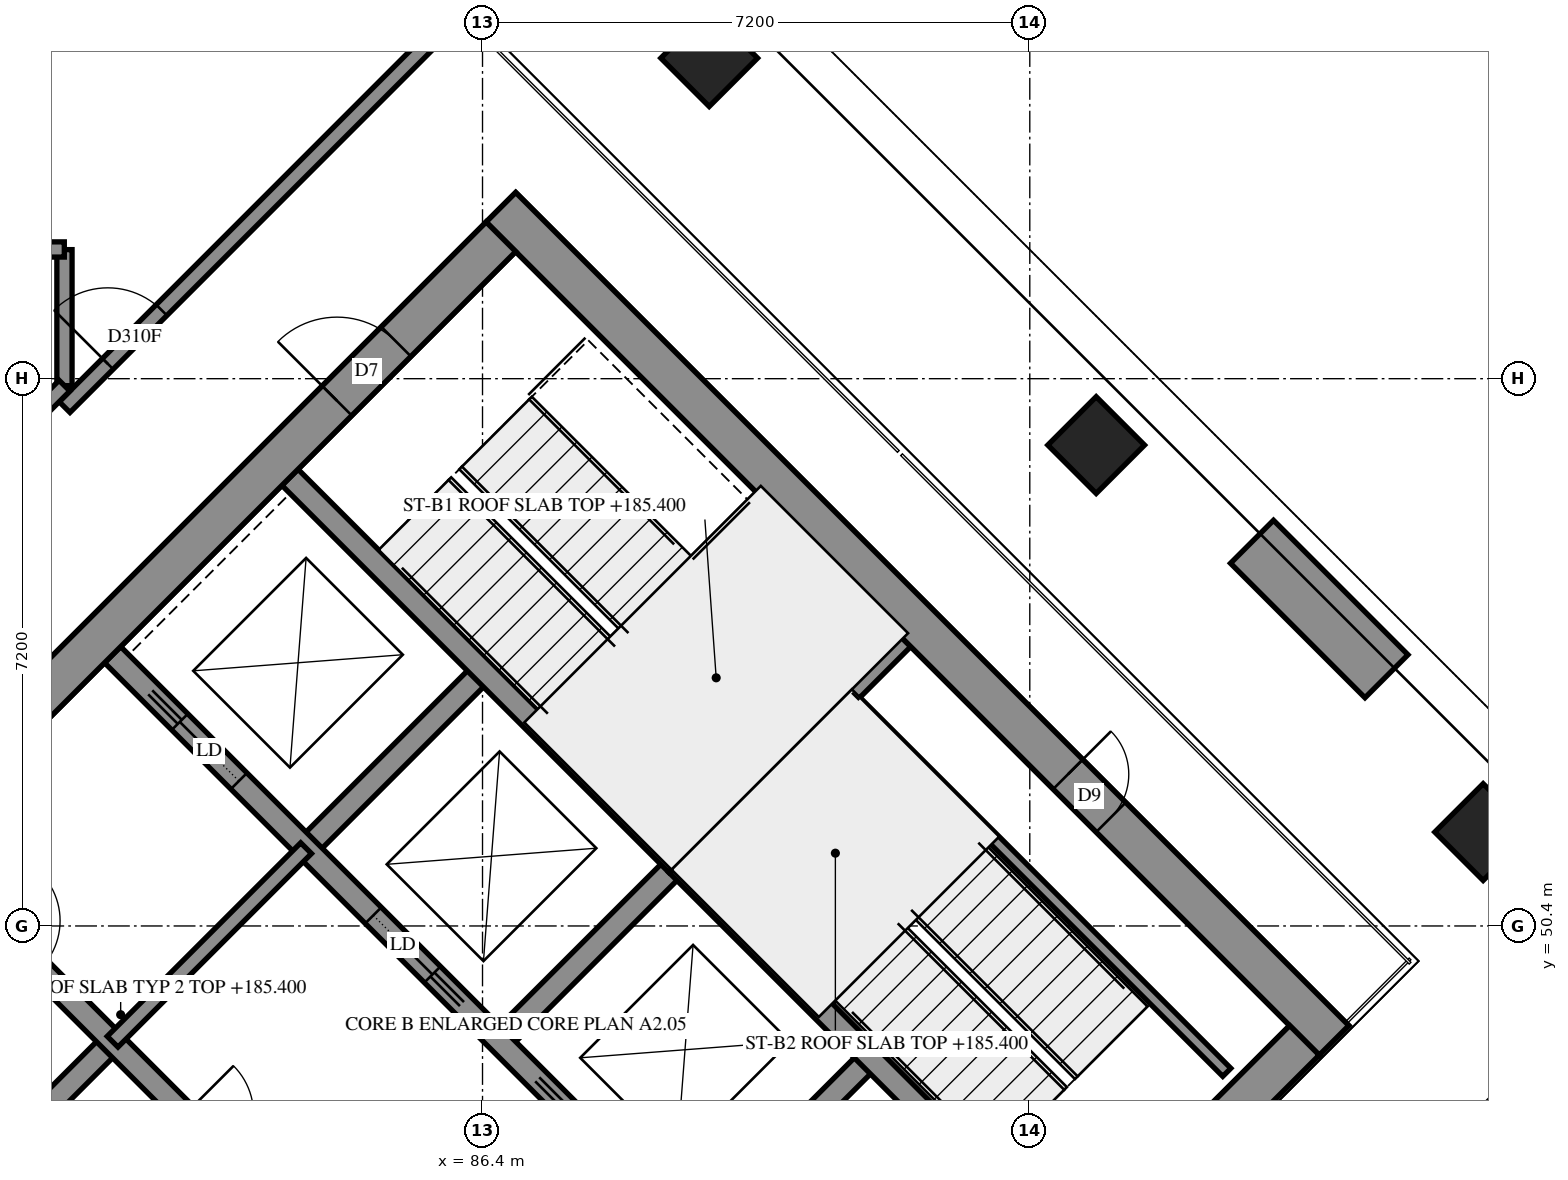
"""IFC4 building model, lengths in metres.
Left out: names, types, materials, properties, quantities, classifications, styles, units other than length and angle.
Written with IfcOpenShell. Run it as: python <this file> out.ifc"""

import sys

from ifc_helpers import new_model, si_unit, direction, frame, frame_2d, origin, origin_2d, place, context, subcontext, project, spatial, rectangle, extrude, element, fill, save


model = new_model("IFC4")
c1 = context("Model", 3, precision=1e-05, world=origin(), true_north=direction((0.0, 1.0)))
c2 = subcontext(c1, "Body", "Model", "MODEL_VIEW")
j1 = project(units=[si_unit("LENGTHUNIT", "METRE"), si_unit("PLANEANGLEUNIT", "RADIAN")], contexts=[c1])
p1 = place(None, origin())
s1 = spatial("IfcSite", under=j1, at=p1, CompositionType="ELEMENT")
p2 = place(p1, origin())
s2 = spatial("IfcBuilding", under=s1, at=p2, CompositionType="ELEMENT")
p3 = place(p2, frame((0.0, 0.0, 185.4)))
s3 = spatial("IfcBuildingStorey", under=s2, at=p3, CompositionType="ELEMENT", Elevation=185.4)
for number, where, z_axis, x_axis in (
    (1, (89.382, 61.818, 0.0), (0.0, 0.0, 1.0), (0.707, -0.707, 0.0)),
    (2, (94.474, 56.727, 0.0), (0.0, 0.0, 1.0), (0.707, -0.707, 0.0)),
    (3, (99.565, 51.635, 0.0), (0.0, 0.0, 1.0), (0.707, -0.707, 0.0)),
):
    element("IfcColumn", number, at=place(p3, frame(where, z_axis=z_axis, x_axis=x_axis)), inside=s3, PredefinedType="COLUMN", context=c2, shape_type="SweptSolid", body=[
        extrude(rectangle(XDim=0.9, YDim=0.9, at=origin_2d()), origin(), (0.0, 0.0, 1.0), 3.9),
    ])
p4 = place(p3, frame((76.071, 49.284, -0.3), z_axis=(0.0, 0.0, 1.0), x_axis=(0.7071035554, -0.707110007, 0.0)))
e4 = element("IfcWall", 4, at=p4, inside=s3, PredefinedType="SHEAR", context=c2, shape_type="SweptSolid", body=[
    extrude(rectangle(XDim=15.5, YDim=0.55, at=frame_2d((7.75, 0.0))), origin(), (0.0, 0.0, 1.0), 3.5),
])
p5 = place(p3, frame((86.642, 59.855, -0.3), z_axis=(0.0, 0.0, 1.0), x_axis=(0.707110007, -0.7071035554, 0.0)))
e5 = element("IfcWall", 5, at=p5, inside=s3, PredefinedType="SHEAR", context=c2, shape_type="SweptSolid", body=[
    extrude(rectangle(XDim=15.5, YDim=0.55, at=frame_2d((7.75, 0.0))), origin(), (0.0, 0.0, 1.0), 3.5),
])
p6 = place(p5, frame((10.55, 0.0, 0.3)))
e6 = element("IfcOpeningElement", 6, at=p6, cuts=e5, PredefinedType="OPENING", context=c2, shape_type="SweptSolid", body=[
    extrude(rectangle(XDim=0.8, YDim=2.1, at=frame_2d((0.4, 1.05))), frame((0.0, 0.285, 0.0), z_axis=(0.0, -1.0, 0.0), x_axis=(1.0, 0.0, 0.0)), (0.0, 0.0, 1.0), 0.57),
])
p7 = place(p3, frame((76.46, 49.284, -0.3), z_axis=(0.0, 0.0, 1.0), x_axis=(0.7071067812, 0.7071067812, 0.0)))
e7 = element("IfcWall", 7, at=p7, inside=s3, PredefinedType="SHEAR", context=c2, shape_type="SweptSolid", body=[
    extrude(rectangle(XDim=14.4, YDim=0.55, at=frame_2d((7.2, 0.0))), origin(), (0.0, 0.0, 1.0), 3.5),
])
p8 = place(p7, frame((4.55, 0.0, 0.3)))
e8 = element("IfcOpeningElement", 8, at=p8, cuts=e7, PredefinedType="OPENING", context=c2, shape_type="SweptSolid", body=[
    extrude(rectangle(XDim=1.1, YDim=2.1, at=frame_2d((0.55, 1.05))), frame((0.0, 0.285, 0.0), z_axis=(0.0, -1.0, 0.0), x_axis=(1.0, 0.0, 0.0)), (0.0, 0.0, 1.0), 0.57),
])
p9 = place(p7, frame((11.35, 0.0, 0.3)))
e9 = element("IfcOpeningElement", 9, at=p9, cuts=e7, PredefinedType="OPENING", context=c2, shape_type="SweptSolid", body=[
    extrude(rectangle(XDim=1.1, YDim=2.1, at=frame_2d((0.55, 1.05))), frame((0.0, 0.285, 0.0), z_axis=(0.0, -1.0, 0.0), x_axis=(1.0, 0.0, 0.0)), (0.0, 0.0, 1.0), 0.57),
])
p10 = place(p3, frame((87.031, 38.713, -0.3), z_axis=(0.0, 0.0, 1.0), x_axis=(0.707103309, 0.7071102534, 0.0)))
e10 = element("IfcWall", 10, at=p10, inside=s3, PredefinedType="SHEAR", context=c2, shape_type="SweptSolid", body=[
    extrude(rectangle(XDim=14.4, YDim=0.55, at=frame_2d((7.2, 0.0))), origin(), (0.0, 0.0, 1.0), 3.5),
])
p11 = place(p10, frame((4.55, 0.0, 0.3)))
e11 = element("IfcOpeningElement", 11, at=p11, cuts=e10, PredefinedType="OPENING", context=c2, shape_type="SweptSolid", body=[
    extrude(rectangle(XDim=1.1, YDim=2.1, at=frame_2d((0.55, 1.05))), frame((0.0, 0.285, 0.0), z_axis=(0.0, -1.0, 0.0), x_axis=(1.0, 0.0, 0.0)), (0.0, 0.0, 1.0), 0.57),
])
p12 = place(p10, frame((11.35, 0.0, 0.3)))
e12 = element("IfcOpeningElement", 12, at=p12, cuts=e10, PredefinedType="OPENING", context=c2, shape_type="SweptSolid", body=[
    extrude(rectangle(XDim=1.1, YDim=2.1, at=frame_2d((0.55, 1.05))), frame((0.0, 0.285, 0.0), z_axis=(0.0, -1.0, 0.0), x_axis=(1.0, 0.0, 0.0)), (0.0, 0.0, 1.0), 0.57),
])
for number, where, z_axis, x_axis in (
    (13, (79.2, 46.544, 0.0), (0.0, 0.0, 1.0), (0.707, 0.707, 0.0)),
    (14, (84.079, 51.423, 0.0), (0.0, 0.0, 1.0), (0.707, 0.707, 0.0)),
):
    element("IfcWall", number, at=place(p3, frame(where, z_axis=z_axis, x_axis=x_axis)), inside=s3, PredefinedType="SOLIDWALL", context=c2, shape_type="SweptSolid", body=[
        extrude(rectangle(XDim=3.3, YDim=0.3, at=frame_2d((1.65, 0.0))), origin(), (0.0, 0.0, 1.0), 3.9),
    ])
for number, where, z_axis, x_axis in (
    (15, (86.625, 48.878, 0.0), (0.0, 0.0, 1.0), (0.707, 0.707, 0.0)),
    (16, (89.17, 46.332, 0.0), (0.0, 0.0, 1.0), (0.707, 0.707, 0.0)),
):
    element("IfcWall", number, at=place(p3, frame(where, z_axis=z_axis, x_axis=x_axis)), inside=s3, PredefinedType="SOLIDWALL", context=c2, shape_type="SweptSolid", body=[
        extrude(rectangle(XDim=3.3, YDim=0.3, at=frame_2d((1.65, 0.0))), origin(), (0.0, 0.0, 1.0), 3.9),
    ])
p13 = place(p3, frame((78.988, 51.423, 0.0), z_axis=(0.0, 0.0, 1.0), x_axis=(0.7071067812, -0.7071067812, 0.0)))
e17 = element("IfcWall", 17, at=p13, inside=s3, PredefinedType="SOLIDWALL", context=c2, shape_type="SweptSolid", body=[
    extrude(rectangle(XDim=14.4, YDim=0.3, at=frame_2d((7.2, 0.0))), origin(), (0.0, 0.0, 1.0), 3.9),
])
p14 = place(p13, frame((1.35, 0.0, 0.0)))
e18 = element("IfcOpeningElement", 18, at=p14, cuts=e17, PredefinedType="OPENING", context=c2, shape_type="SweptSolid", body=[
    extrude(rectangle(XDim=0.9, YDim=2.1, at=frame_2d((0.45, 1.05))), frame((0.0, 0.16, 0.0), z_axis=(0.0, -1.0, 0.0), x_axis=(1.0, 0.0, 0.0)), (0.0, 0.0, 1.0), 0.32),
])
p15 = place(p13, frame((4.95, 0.0, 0.0)))
e19 = element("IfcOpeningElement", 19, at=p15, cuts=e17, PredefinedType="OPENING", context=c2, shape_type="SweptSolid", body=[
    extrude(rectangle(XDim=0.9, YDim=2.1, at=frame_2d((0.45, 1.05))), frame((0.0, 0.16, 0.0), z_axis=(0.0, -1.0, 0.0), x_axis=(1.0, 0.0, 0.0)), (0.0, 0.0, 1.0), 0.32),
])
p16 = place(p13, frame((8.55, 0.0, 0.0)))
e20 = element("IfcOpeningElement", 20, at=p16, cuts=e17, PredefinedType="OPENING", context=c2, shape_type="SweptSolid", body=[
    extrude(rectangle(XDim=0.9, YDim=2.1, at=frame_2d((0.45, 1.05))), frame((0.0, 0.16, 0.0), z_axis=(0.0, -1.0, 0.0), x_axis=(1.0, 0.0, 0.0)), (0.0, 0.0, 1.0), 0.32),
])
p17 = place(p13, frame((12.05, 0.0, 0.0)))
e21 = element("IfcOpeningElement", 21, at=p17, cuts=e17, PredefinedType="OPENING", context=c2, shape_type="SweptSolid", body=[
    extrude(rectangle(XDim=1.1, YDim=2.1, at=frame_2d((0.55, 1.05))), frame((0.0, 0.16, 0.0), z_axis=(0.0, -1.0, 0.0), x_axis=(1.0, 0.0, 0.0)), (0.0, 0.0, 1.0), 0.32),
])
p18 = place(p3, frame((81.534, 53.969, 0.0), z_axis=(0.0, 0.0, 1.0), x_axis=(0.707103309, -0.7071102534, 0.0)))
e22 = element("IfcWall", 22, at=p18, inside=s3, PredefinedType="SOLIDWALL", context=c2, shape_type="SweptSolid", body=[
    extrude(rectangle(XDim=14.4, YDim=0.3, at=frame_2d((7.2, 0.0))), origin(), (0.0, 0.0, 1.0), 3.9),
])
p19 = place(p18, frame((1.25, 0.0, 0.0)))
e23 = element("IfcOpeningElement", 23, at=p19, cuts=e22, PredefinedType="OPENING", context=c2, shape_type="SweptSolid", body=[
    extrude(rectangle(XDim=1.1, YDim=2.1, at=frame_2d((0.55, 1.05))), frame((0.0, 0.16, 0.0), z_axis=(0.0, -1.0, 0.0), x_axis=(1.0, 0.0, 0.0)), (0.0, 0.0, 1.0), 0.32),
])
p20 = place(p18, frame((4.85, 0.0, 0.0)))
e24 = element("IfcOpeningElement", 24, at=p20, cuts=e22, PredefinedType="OPENING", context=c2, shape_type="SweptSolid", body=[
    extrude(rectangle(XDim=1.1, YDim=2.1, at=frame_2d((0.55, 1.05))), frame((0.0, 0.16, 0.0), z_axis=(0.0, -1.0, 0.0), x_axis=(1.0, 0.0, 0.0)), (0.0, 0.0, 1.0), 0.32),
])
p21 = place(p18, frame((8.45, 0.0, 0.0)))
e25 = element("IfcOpeningElement", 25, at=p21, cuts=e22, PredefinedType="OPENING", context=c2, shape_type="SweptSolid", body=[
    extrude(rectangle(XDim=1.1, YDim=2.1, at=frame_2d((0.55, 1.05))), frame((0.0, 0.16, 0.0), z_axis=(0.0, -1.0, 0.0), x_axis=(1.0, 0.0, 0.0)), (0.0, 0.0, 1.0), 0.32),
])
p22 = place(p18, frame((12.05, 0.0, 0.0)))
e26 = element("IfcOpeningElement", 26, at=p22, cuts=e22, PredefinedType="OPENING", context=c2, shape_type="SweptSolid", body=[
    extrude(rectangle(XDim=1.1, YDim=2.1, at=frame_2d((0.55, 1.05))), frame((0.0, 0.16, 0.0), z_axis=(0.0, -1.0, 0.0), x_axis=(1.0, 0.0, 0.0)), (0.0, 0.0, 1.0), 0.32),
])
for number, where, z_axis, x_axis in (
    (27, (83.867, 56.302, 0.0), (0.0, 0.0, 1.0), (0.707, -0.707, 0.0)),
    (28, (88.958, 51.211, 0.0), (0.0, 0.0, 1.0), (0.707, -0.707, 0.0)),
):
    element("IfcWall", number, at=place(p3, frame(where, z_axis=z_axis, x_axis=x_axis)), inside=s3, PredefinedType="SOLIDWALL", context=c2, shape_type="SweptSolid", body=[
        extrude(rectangle(XDim=7.2, YDim=0.3, at=frame_2d((3.6, 0.0))), origin(), (0.0, 0.0, 1.0), 3.9),
    ])
p23 = place(p3, frame((88.958, 51.211, 0.0), z_axis=(0.0, 0.0, 1.0), x_axis=(0.7071067812, 0.7071067812, 0.0)))
e29 = element("IfcWall", 29, at=p23, inside=s3, PredefinedType="SOLIDWALL", context=c2, shape_type="SweptSolid", body=[
    extrude(rectangle(XDim=4.2, YDim=0.3, at=frame_2d((2.1, 0.0))), origin(), (0.0, 0.0, 1.0), 3.9),
])
p24 = place(p3, frame((99.07, 46.968, 0.0), z_axis=(0.0, 0.0, 1.0), x_axis=(0.7071067812, 0.7071067812, 0.0)))
e30 = element("IfcWall", 30, at=p24, inside=s3, PredefinedType="SOLIDWALL", context=c2, shape_type="SweptSolid", body=[
    extrude(rectangle(XDim=3.6, YDim=0.8, at=frame_2d((1.8, 0.0))), origin(), (0.0, 0.0, 1.0), 0.65),
])
p25 = place(p3, frame((98.293, 53.685, 0.0), z_axis=(0.0, 0.0, 1.0), x_axis=(-0.7071067812, 0.7071067812, 0.0)))
e31 = element("IfcWall", 31, at=p25, inside=s3, PredefinedType="SOLIDWALL", context=c2, shape_type="SweptSolid", body=[
    extrude(rectangle(XDim=2.502, YDim=0.8, at=frame_2d((1.251, 0.0))), origin(), (0.0, 0.0, 1.0), 0.65),
])
p26 = place(p3, frame((91.313, 53.354, 0.0), z_axis=(0.0, 0.0, 1.0), x_axis=(0.7071140275, -0.7070995348, 0.0)))
e32 = element("IfcWall", 32, at=p26, inside=s3, PredefinedType="PARTITIONING", context=c2, shape_type="SweptSolid", body=[
    extrude(rectangle(XDim=6.9, YDim=0.15, at=frame_2d((3.45, 0.0))), origin(), (0.0, 0.0, 1.0), 3.9),
])
p27 = place(p3, frame((81.534, 48.878, 0.0), z_axis=(0.0, 0.0, 1.0), x_axis=(0.707092892, 0.7071206701, 0.0)))
e33 = element("IfcWall", 33, at=p27, inside=s3, PredefinedType="PARTITIONING", context=c2, shape_type="SweptSolid", body=[
    extrude(rectangle(XDim=3.6, YDim=0.2, at=frame_2d((1.8, 0.0))), origin(), (0.0, 0.0, 1.0), 3.9),
])
p28 = place(p3, frame((80.902, 57.226, 0.0), z_axis=(0.0, 0.0, 1.0), x_axis=(0.7069700233, 0.7072435126, 0.0)))
e34 = element("IfcWall", 34, at=p28, inside=s3, PredefinedType="PARTITIONING", context=c2, shape_type="SweptSolid", body=[
    extrude(rectangle(XDim=7.313, YDim=0.2, at=frame_2d((3.656, 0.0))), origin(), (0.0, 0.0, 1.0), 3.9),
])
p29 = place(p28, frame((0.805, 0.0, 0.0)))
e35 = element("IfcOpeningElement", 35, at=p29, cuts=e34, PredefinedType="OPENING", context=c2, shape_type="SweptSolid", body=[
    extrude(rectangle(XDim=1.0, YDim=2.1, at=frame_2d((0.5, 1.05))), frame((0.0, 0.11, 0.0), z_axis=(0.0, -1.0, 0.0), x_axis=(1.0, 0.0, 0.0)), (0.0, 0.0, 1.0), 0.22),
])
p30 = place(p3, frame((80.9, 57.508, 0.0), z_axis=(0.0, 0.0, 1.0), x_axis=(0.0, 1.0, 0.0)))
e36 = element("IfcWall", 36, at=p30, inside=s3, PredefinedType="PARTITIONING", context=c2, shape_type="SweptSolid", body=[
    extrude(rectangle(XDim=1.79, YDim=0.2, at=frame_2d((0.895, 0.0))), origin(), (0.0, 0.0, 1.0), 3.9),
])
p31 = place(p3, frame((79.802, 56.408, 0.0), z_axis=(0.0, 0.0, 1.0), x_axis=(0.7064630795, 0.7077498975, 0.0)))
e37 = element("IfcWall", 37, at=p31, inside=s3, PredefinedType="PARTITIONING", context=c2, shape_type="SweptSolid", body=[
    extrude(rectangle(XDim=1.554, YDim=0.2, at=frame_2d((0.777, 0.0))), origin(), (0.0, 0.0, 1.0), 3.9),
])
p32 = place(p3, frame((79.8, 59.3, 0.0), z_axis=(0.0, 0.0, 1.0), x_axis=(1.0, 0.0, 0.0)))
e38 = element("IfcWall", 38, at=p32, inside=s3, PredefinedType="PARTITIONING", context=c2, shape_type="SweptSolid", body=[
    extrude(rectangle(XDim=1.098, YDim=0.2, at=frame_2d((0.549, 0.0))), origin(), (0.0, 0.0, 1.0), 3.9),
])
p33 = place(p6, origin())
e39 = element("IfcDoor", 39, at=p33, inside=s3, OperationType="SINGLE_SWING_RIGHT", PredefinedType="DOOR", context=c2, shape_type="SweptSolid", body=[
    extrude(rectangle(XDim=0.8, YDim=2.1, at=frame_2d((0.4, 1.05))), frame((0.0, 0.025, 0.0), z_axis=(0.0, -1.0, 0.0), x_axis=(1.0, 0.0, 0.0)), (0.0, 0.0, 1.0), 0.05),
])
fill(e6, e39)
p34 = place(p9, origin())
e40 = element("IfcDoor", 40, at=p34, inside=s3, OperationType="SINGLE_SWING_LEFT", PredefinedType="DOOR", context=c2, shape_type="SweptSolid", body=[
    extrude(rectangle(XDim=1.1, YDim=2.1, at=frame_2d((0.55, 1.05))), frame((0.0, 0.025, 0.0), z_axis=(0.0, -1.0, 0.0), x_axis=(1.0, 0.0, 0.0)), (0.0, 0.0, 1.0), 0.05),
])
fill(e9, e40)
p35 = place(p19, origin())
e41 = element("IfcDoor", 41, at=p35, inside=s3, OperationType="SLIDING_TO_LEFT", PredefinedType="DOOR", context=c2, shape_type="SweptSolid", body=[
    extrude(rectangle(XDim=1.1, YDim=2.1, at=frame_2d((0.55, 1.05))), frame((0.0, 0.025, 0.0), z_axis=(0.0, -1.0, 0.0), x_axis=(1.0, 0.0, 0.0)), (0.0, 0.0, 1.0), 0.05),
])
fill(e23, e41)
p36 = place(p20, origin())
e42 = element("IfcDoor", 42, at=p36, inside=s3, OperationType="SLIDING_TO_RIGHT", PredefinedType="DOOR", context=c2, shape_type="SweptSolid", body=[
    extrude(rectangle(XDim=1.1, YDim=2.1, at=frame_2d((0.55, 1.05))), frame((0.0, 0.025, 0.0), z_axis=(0.0, -1.0, 0.0), x_axis=(1.0, 0.0, 0.0)), (0.0, 0.0, 1.0), 0.05),
])
fill(e24, e42)
p37 = place(p29, origin())
e43 = element("IfcDoor", 43, at=p37, inside=s3, OperationType="SINGLE_SWING_RIGHT", PredefinedType="DOOR", context=c2, shape_type="SweptSolid", body=[
    extrude(rectangle(XDim=1.0, YDim=2.1, at=frame_2d((0.5, 1.05))), frame((0.0, 0.025, 0.0), z_axis=(0.0, -1.0, 0.0), x_axis=(1.0, 0.0, 0.0)), (0.0, 0.0, 1.0), 0.05),
])
fill(e35, e43)
save(model, sys.argv[1])
